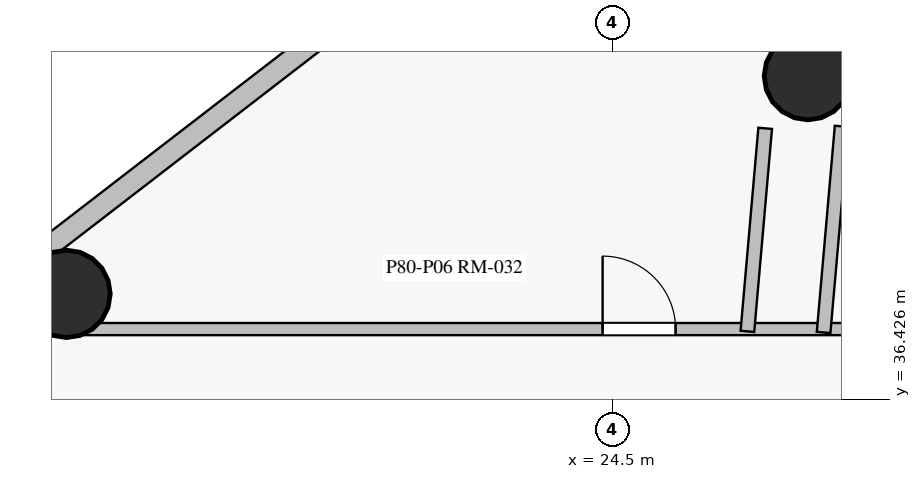
"""IFC4 building model, lengths in metres.
Left out: names, types, materials, properties, quantities, classifications, styles, units other than length and angle.
Written with IfcOpenShell. Run it as: python <this file> out.ifc"""

import sys

from ifc_helpers import new_model, si_unit, direction, frame, frame_2d, origin, origin_with_axes, origin_2d, place, context, subcontext, project, spatial, rectangle, circle, extrude, source, transform, mapped, element, fill, save


model = new_model("IFC4")
c1 = context("Model", 3, precision=1e-05, world=origin(), true_north=direction((0.0, 1.0)))
c2 = subcontext(c1, "Body", "Model", "MODEL_VIEW")
j1 = project(units=[si_unit("LENGTHUNIT", "METRE"), si_unit("PLANEANGLEUNIT", "RADIAN")], contexts=[c1])
p1 = place(None, origin())
s1 = spatial("IfcSite", under=j1, at=p1, CompositionType="ELEMENT")
p2 = place(p1, origin())
s2 = spatial("IfcBuilding", under=s1, at=p2, CompositionType="ELEMENT")
p3 = place(p2, frame((0.0, 0.0, 268.75)))
s3 = spatial("IfcBuildingStorey", under=s2, at=p3, CompositionType="ELEMENT", Elevation=268.75)
m1 = source(origin_with_axes(), c2, "Body", "SweptSolid", [
    extrude(circle(Radius=0.575, at=origin_2d()), origin(), (0.0, 0.0, 1.0), 4.65),
])
for number, where, z_axis, x_axis in (
    (1, (27.073, 40.677, 0.0), (0.0, 0.0, 1.0), (1.0, 0.0, 0.0)),
    (2, (17.32, 37.813, 0.0), (0.0, 0.0, 1.0), (1.0, 0.0, 0.0)),
):
    element("IfcColumn", number, at=place(p3, frame(where, z_axis=z_axis, x_axis=x_axis)), inside=s3, PredefinedType="COLUMN", context=c2, shape_type="MappedRepresentation", body=[
        mapped(m1, transform((0.0, 0.0, 0.0), scale=1.0)),
    ])
p4 = place(p3, frame((24.393, 44.071, 0.0), z_axis=(0.0, 0.0, 1.0), x_axis=(-0.79188114586, -0.610675241706, 0.0)))
e3 = element("IfcWall", 3, at=p4, inside=s3, PredefinedType="SOLIDWALL", context=c2, shape_type="SweptSolid", body=[
    extrude(rectangle(XDim=11.836, YDim=0.28, at=frame_2d((5.918, 0.0))), origin(), (0.0, 0.0, 1.0), 4.375),
])
p5 = place(p3, frame((16.5, 37.35, 0.0), z_axis=(0.0, 0.0, 1.0), x_axis=(1.0, 0.0, 0.0)))
e4 = element("IfcWall", 4, at=p5, inside=s3, PredefinedType="PARTITIONING", context=c2, shape_type="SweptSolid", body=[
    extrude(rectangle(XDim=23.85, YDim=0.16, at=frame_2d((11.925, 0.0))), origin(), (0.0, 0.0, 1.0), 3.475),
])
p6 = place(p5, frame((11.69, 0.0, 0.0)))
e5 = element("IfcOpeningElement", 5, at=p6, cuts=e4, PredefinedType="OPENING", context=c2, shape_type="SweptSolid", body=[
    extrude(rectangle(XDim=0.96, YDim=2.15, at=frame_2d((0.48, 1.075))), frame((0.0, 0.09, 0.0), z_axis=(0.0, -1.0, 0.0), x_axis=(1.0, 0.0, 0.0)), (0.0, 0.0, 1.0), 0.18),
])
p7 = place(p5, frame((7.873, 0.0, 0.0)))
e6 = element("IfcOpeningElement", 6, at=p7, cuts=e4, PredefinedType="OPENING", context=c2, shape_type="SweptSolid", body=[
    extrude(rectangle(XDim=0.96, YDim=2.15, at=frame_2d((0.48, 1.075))), frame((0.0, 0.09, 0.0), z_axis=(0.0, -1.0, 0.0), x_axis=(1.0, 0.0, 0.0)), (0.0, 0.0, 1.0), 0.18),
])
p8 = place(p3, frame((27.28, 37.305, 0.0), z_axis=(0.0, 0.0, 1.0), x_axis=(0.087171400335, 0.996193328106, 0.0)))
e7 = element("IfcWall", 7, at=p8, inside=s3, PredefinedType="PARTITIONING", context=c2, shape_type="SweptSolid", body=[
    extrude(rectangle(XDim=2.722, YDim=0.18, at=frame_2d((1.361, 0.0))), origin(), (0.0, 0.0, 1.0), 3.475),
])
p9 = place(p3, frame((26.511, 39.991, 0.0), z_axis=(0.0, 0.0, 1.0), x_axis=(-0.087144358245, -0.996195694041, 0.0)))
e8 = element("IfcWall", 8, at=p9, inside=s3, PredefinedType="PARTITIONING", context=c2, shape_type="SweptSolid", body=[
    extrude(rectangle(XDim=2.681, YDim=0.18, at=frame_2d((1.341, 0.0))), origin(), (0.0, 0.0, 1.0), 3.475),
])
m2 = source(origin_with_axes(), c2, "Body", "SweptSolid", [
    extrude(rectangle(XDim=0.96, YDim=2.15, at=frame_2d((0.48, 1.075))), frame((0.0, 0.025, 0.0), z_axis=(0.0, -1.0, 0.0), x_axis=(1.0, 0.0, 0.0)), (0.0, 0.0, 1.0), 0.05),
])
p10 = place(p7, origin())
e9 = element("IfcDoor", 9, at=p10, inside=s3, OperationType="SINGLE_SWING_LEFT", PredefinedType="DOOR", context=c2, shape_type="MappedRepresentation", body=[
    mapped(m2, transform((0.0, 0.0, 0.0), scale=1.0)),
])
fill(e6, e9)
save(model, sys.argv[1])
